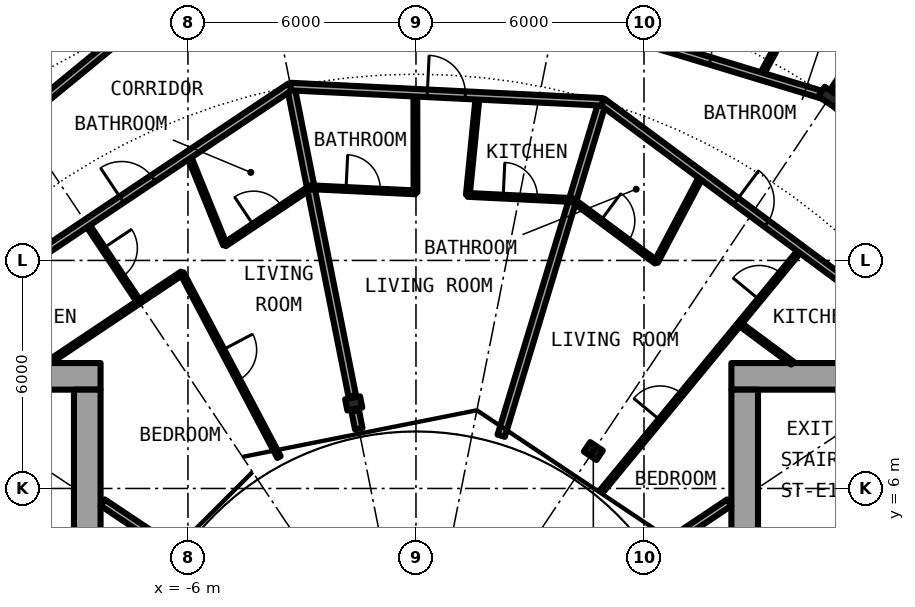
"""IFC4 building model, lengths in metres.
Left out: names, types, materials, properties, quantities, classifications, styles, units other than length and angle.
Written with IfcOpenShell. Run it as: python <this file> out.ifc"""

import sys

from ifc_helpers import new_model, si_unit, direction, frame, frame_2d, origin, origin_2d, place, context, subcontext, project, spatial, rectangle, i_section, extrude, element, fill, save


model = new_model("IFC4")
c1 = context("Model", 3, precision=1e-05, world=origin(), true_north=direction((0.0, 1.0)))
c2 = subcontext(c1, "Body", "Model", "MODEL_VIEW")
j1 = project(units=[si_unit("LENGTHUNIT", "METRE"), si_unit("PLANEANGLEUNIT", "RADIAN")], contexts=[c1])
p1 = place(None, origin())
s1 = spatial("IfcSite", under=j1, at=p1, CompositionType="ELEMENT")
p2 = place(p1, origin())
s2 = spatial("IfcBuilding", under=s1, at=p2, CompositionType="ELEMENT")
p3 = place(p2, frame((0.0, 0.0, 88.0)))
s3 = spatial("IfcBuildingStorey", under=s2, at=p3, CompositionType="ELEMENT", Elevation=88.0)
p4 = place(p3, frame((10.889, 16.297, 0.0), z_axis=(0.0, 0.0, 1.0), x_axis=(0.55557023302, 0.831469612303, 0.0)))
e1 = element("IfcColumn", 1, at=p4, inside=s3, PredefinedType="COLUMN", context=c2, shape_type="SweptSolid", body=[
    extrude(i_section(OverallWidth=0.306, OverallDepth=0.524, WebThickness=0.021, FlangeThickness=0.04, FilletRadius=0.027, at=origin_2d()), origin(), (0.0, 0.0, 1.0), 3.05),
])
for number, where, z_axis, x_axis in (
    (2, (4.667, 6.984, 0.0), (0.0, 0.0, 1.0), (0.556, 0.831, 0.0)),
    (3, (-1.639, 8.239, 0.0), (0.0, 0.0, 1.0), (-0.195, 0.981, 0.0)),
):
    element("IfcColumn", number, at=place(p3, frame(where, z_axis=z_axis, x_axis=x_axis)), inside=s3, PredefinedType="COLUMN", context=c2, shape_type="SweptSolid", body=[
        extrude(i_section(OverallWidth=0.3, OverallDepth=0.4, WebThickness=0.013, FlangeThickness=0.024, FilletRadius=0.027, at=origin_2d()), origin(), (0.0, 0.0, 1.0), 3.05),
    ])
p5 = place(p3, frame((22.3, 8.95, 0.0), z_axis=(0.0, 0.0, 1.0), x_axis=(-1.0, 0.0, 0.0)))
e4 = element("IfcWall", 4, at=p5, inside=s3, PredefinedType="SHEAR", context=c2, shape_type="SweptSolid", body=[
    extrude(rectangle(XDim=14.0, YDim=0.7, at=frame_2d((7.0, 0.0))), origin(), (0.0, 0.0, 1.0), 3.05),
])
p6 = place(p5, frame((1.225, 0.0, 0.0)))
e5 = element("IfcOpeningElement", 5, at=p6, cuts=e4, PredefinedType="OPENING", context=c2, shape_type="SweptSolid", body=[
    extrude(rectangle(XDim=1.2, YDim=2.3, at=frame_2d((0.6, 1.15))), frame((0.0, 0.36, 0.0), z_axis=(0.0, -1.0, 0.0), x_axis=(1.0, 0.0, 0.0)), (0.0, 0.0, 1.0), 0.72),
])
p7 = place(p3, frame((8.65, -8.6, 0.0), z_axis=(0.0, 0.0, 1.0), x_axis=(0.0, 1.0, 0.0)))
e6 = element("IfcWall", 6, at=p7, inside=s3, PredefinedType="SHEAR", context=c2, shape_type="SweptSolid", body=[
    extrude(rectangle(XDim=17.2, YDim=0.7, at=frame_2d((8.6, 0.0))), origin(), (0.0, 0.0, 1.0), 3.05),
])
p8 = place(p7, frame((7.4, 0.0, 0.1)))
e7 = element("IfcOpeningElement", 7, at=p8, cuts=e6, PredefinedType="OPENING", context=c2, shape_type="SweptSolid", body=[
    extrude(rectangle(XDim=2.4, YDim=2.2, at=frame_2d((1.2, 1.1))), frame((0.0, 0.36, 0.0), z_axis=(0.0, -1.0, 0.0), x_axis=(1.0, 0.0, 0.0)), (0.0, 0.0, 1.0), 0.72),
])
p9 = place(p3, frame((-8.3, 8.95, 0.0), z_axis=(0.0, 0.0, 1.0), x_axis=(-1.0, 0.0, 0.0)))
e8 = element("IfcWall", 8, at=p9, inside=s3, PredefinedType="SHEAR", context=c2, shape_type="SweptSolid", body=[
    extrude(rectangle(XDim=14.0, YDim=0.7, at=frame_2d((7.0, 0.0))), origin(), (0.0, 0.0, 1.0), 3.05),
])
p10 = place(p9, frame((11.575, 0.0, 0.0)))
e9 = element("IfcOpeningElement", 9, at=p10, cuts=e8, PredefinedType="OPENING", context=c2, shape_type="SweptSolid", body=[
    extrude(rectangle(XDim=1.2, YDim=2.3, at=frame_2d((0.6, 1.15))), frame((0.0, 0.36, 0.0), z_axis=(0.0, -1.0, 0.0), x_axis=(1.0, 0.0, 0.0)), (0.0, 0.0, 1.0), 0.72),
])
p11 = place(p3, frame((-8.65, 8.6, 0.0), z_axis=(0.0, 0.0, 1.0), x_axis=(0.0, -1.0, 0.0)))
e10 = element("IfcWall", 10, at=p11, inside=s3, PredefinedType="SHEAR", context=c2, shape_type="SweptSolid", body=[
    extrude(rectangle(XDim=17.2, YDim=0.7, at=frame_2d((8.6, 0.0))), origin(), (0.0, 0.0, 1.0), 3.05),
])
p12 = place(p11, frame((7.4, 0.0, 0.1)))
e11 = element("IfcOpeningElement", 11, at=p12, cuts=e10, PredefinedType="OPENING", context=c2, shape_type="SweptSolid", body=[
    extrude(rectangle(XDim=2.4, YDim=2.2, at=frame_2d((1.2, 1.1))), frame((0.0, 0.36, 0.0), z_axis=(0.0, -1.0, 0.0), x_axis=(1.0, 0.0, 0.0)), (0.0, 0.0, 1.0), 0.72),
])
p13 = place(p3, frame((-8.674, 12.982, 0.0), z_axis=(0.0, 0.0, 1.0), x_axis=(0.555355163998, -0.831613276602, 0.0)))
e12 = element("IfcWall", 12, at=p13, inside=s3, PredefinedType="PARTITIONING", context=c2, shape_type="SweptSolid", body=[
    extrude(rectangle(XDim=2.494, YDim=0.1, at=frame_2d((1.247, 0.0))), origin(), (0.0, 0.0, 1.0), 2.7),
])
p14 = place(p13, frame((0.797, 0.0, 0.0)))
e13 = element("IfcOpeningElement", 13, at=p14, cuts=e12, PredefinedType="OPENING", context=c2, shape_type="SweptSolid", body=[
    extrude(rectangle(XDim=0.9, YDim=2.3, at=frame_2d((0.45, 1.15))), frame((0.0, 0.06, 0.0), z_axis=(0.0, -1.0, 0.0), x_axis=(1.0, 0.0, 0.0)), (0.0, 0.0, 1.0), 0.12),
])
p15 = place(p3, frame((-6.159, 11.663, 0.0), z_axis=(0.0, 0.0, 1.0), x_axis=(0.466976820365, -0.884269556889, 0.0)))
e14 = element("IfcWall", 14, at=p15, inside=s3, PredefinedType="PARTITIONING", context=c2, shape_type="SweptSolid", body=[
    extrude(rectangle(XDim=5.469, YDim=0.1, at=frame_2d((2.735, 0.0))), origin(), (0.0, 0.0, 1.0), 2.7),
])
p16 = place(p15, frame((2.284, 0.0, 0.0)))
e15 = element("IfcOpeningElement", 15, at=p16, cuts=e14, PredefinedType="OPENING", context=c2, shape_type="SweptSolid", body=[
    extrude(rectangle(XDim=0.9, YDim=2.3, at=frame_2d((0.45, 1.15))), frame((0.0, 0.06, 0.0), z_axis=(0.0, -1.0, 0.0), x_axis=(1.0, 0.0, 0.0)), (0.0, 0.0, 1.0), 0.12),
])
p17 = place(p3, frame((-5.986, 14.779, 0.0), z_axis=(0.0, 0.0, 1.0), x_axis=(0.375649498413, -0.926761811008, 0.0)))
e16 = element("IfcWall", 16, at=p17, inside=s3, PredefinedType="PARTITIONING", context=c2, shape_type="SweptSolid", body=[
    extrude(rectangle(XDim=2.548, YDim=0.1, at=frame_2d((1.274, 0.0))), origin(), (0.0, 0.0, 1.0), 2.7),
])
p18 = place(p3, frame((-3.297, 16.575, 0.0), z_axis=(0.0, 0.0, 1.0), x_axis=(0.195205282633, -0.980762406311, 0.0)))
e17 = element("IfcWall", 17, at=p18, inside=s3, PredefinedType="PARTITIONING", context=c2, shape_type="SweptSolid", body=[
    extrude(rectangle(XDim=8.3, YDim=0.2, at=frame_2d((4.15, 0.0))), origin(), (0.0, 0.0, 1.0), 2.7),
])
p19 = place(p3, frame((-1.599, 8.043, 0.0), z_axis=(0.0, 0.0, 1.0), x_axis=(0.193768289311, -0.981047323047, 0.0)))
e18 = element("IfcWall", 18, at=p19, inside=s3, PredefinedType="PARTITIONING", context=c2, shape_type="SweptSolid", body=[
    extrude(rectangle(XDim=0.48, YDim=0.2, at=frame_2d((0.24, 0.0))), origin(), (0.0, 0.0, 1.0), 2.7),
])
p20 = place(p3, frame((-0.013, 13.792, 0.0), z_axis=(0.0, 0.0, 1.0), x_axis=(-0.001210427419, 0.999999267432, 0.0)))
e19 = element("IfcWall", 19, at=p20, inside=s3, PredefinedType="PARTITIONING", context=c2, shape_type="SweptSolid", body=[
    extrude(rectangle(XDim=2.622, YDim=0.1, at=frame_2d((1.311, 0.0))), origin(), (0.0, 0.0, 1.0), 2.7),
])
p21 = place(p3, frame((1.365, 13.724, 0.0), z_axis=(0.0, 0.0, 1.0), x_axis=(0.099171803948, 0.995070325807, 0.0)))
e20 = element("IfcWall", 20, at=p21, inside=s3, PredefinedType="PARTITIONING", context=c2, shape_type="SweptSolid", body=[
    extrude(rectangle(XDim=2.622, YDim=0.1, at=frame_2d((1.311, 0.0))), origin(), (0.0, 0.0, 1.0), 2.7),
])
p22 = place(p3, frame((2.243, 7.387, 0.0), z_axis=(0.0, 0.0, 1.0), x_axis=(0.290196345171, 0.956967126525, 0.0)))
e21 = element("IfcWall", 21, at=p22, inside=s3, PredefinedType="PARTITIONING", context=c2, shape_type="SweptSolid", body=[
    extrude(rectangle(XDim=9.18, YDim=0.2, at=frame_2d((4.59, 0.0))), origin(), (0.0, 0.0, 1.0), 2.7),
])
p23 = place(p3, frame((4.909, 5.958, 0.0), z_axis=(0.0, 0.0, 1.0), x_axis=(0.635976043025, 0.771708800454, 0.0)))
e22 = element("IfcWall", 22, at=p23, inside=s3, PredefinedType="PARTITIONING", context=c2, shape_type="SweptSolid", body=[
    extrude(rectangle(XDim=8.213, YDim=0.1, at=frame_2d((4.106, 0.0))), origin(), (0.0, 0.0, 1.0), 2.7),
])
p24 = place(p23, frame((6.49, 0.0, 0.0)))
e23 = element("IfcOpeningElement", 23, at=p24, cuts=e22, PredefinedType="OPENING", context=c2, shape_type="SweptSolid", body=[
    extrude(rectangle(XDim=0.9, YDim=2.3, at=frame_2d((0.45, 1.15))), frame((0.0, 0.06, 0.0), z_axis=(0.0, -1.0, 0.0), x_axis=(1.0, 0.0, 0.0)), (0.0, 0.0, 1.0), 0.12),
])
p25 = place(p23, frame((2.384, 0.0, 0.0)))
e24 = element("IfcOpeningElement", 24, at=p25, cuts=e22, PredefinedType="OPENING", context=c2, shape_type="SweptSolid", body=[
    extrude(rectangle(XDim=0.9, YDim=2.3, at=frame_2d((0.45, 1.15))), frame((0.0, 0.06, 0.0), z_axis=(0.0, -1.0, 0.0), x_axis=(1.0, 0.0, 0.0)), (0.0, 0.0, 1.0), 0.12),
])
p26 = place(p3, frame((6.318, 11.96, 0.0), z_axis=(0.0, 0.0, 1.0), x_axis=(0.467001992543, 0.884256263173, 0.0)))
e25 = element("IfcWall", 25, at=p26, inside=s3, PredefinedType="PARTITIONING", context=c2, shape_type="SweptSolid", body=[
    extrude(rectangle(XDim=2.572, YDim=0.1, at=frame_2d((1.286, 0.0))), origin(), (0.0, 0.0, 1.0), 2.7),
])
p27 = place(p3, frame((9.074, 16.847, 0.0), z_axis=(0.0, 0.0, 1.0), x_axis=(0.474160570331, 0.880438387136, 0.0)))
e26 = element("IfcWall", 26, at=p27, inside=s3, PredefinedType="PARTITIONING", context=c2, shape_type="SweptSolid", body=[
    extrude(rectangle(XDim=2.636, YDim=0.1, at=frame_2d((1.318, 0.0))), origin(), (0.0, 0.0, 1.0), 2.7),
])
p28 = place(p27, frame((0.868, 0.0, 0.0)))
e27 = element("IfcOpeningElement", 27, at=p28, cuts=e26, PredefinedType="OPENING", context=c2, shape_type="SweptSolid", body=[
    extrude(rectangle(XDim=0.9, YDim=2.3, at=frame_2d((0.45, 1.15))), frame((0.0, 0.06, 0.0), z_axis=(0.0, -1.0, 0.0), x_axis=(1.0, 0.0, 0.0)), (0.0, 0.0, 1.0), 0.12),
])
p29 = place(p3, frame((11.035, 16.515, 0.0), z_axis=(0.0, 0.0, 1.0), x_axis=(0.555516661303, 0.831505405283, 0.0)))
e28 = element("IfcWall", 28, at=p29, inside=s3, PredefinedType="PARTITIONING", context=c2, shape_type="SweptSolid", body=[
    extrude(rectangle(XDim=7.312, YDim=0.2, at=frame_2d((3.656, 0.0))), origin(), (0.0, 0.0, 1.0), 2.7),
])
for number, where, z_axis, x_axis in (
    (29, (-6.513, 4.472, 0.0), (0.0, 0.0, 1.0), (-0.831, 0.556, 0.0)),
    (30, (6.513, 4.472, 0.0), (0.0, 0.0, 1.0), (0.831, 0.556, 0.0)),
):
    element("IfcWall", number, at=place(p3, frame(where, z_axis=z_axis, x_axis=x_axis)), inside=s3, PredefinedType="PARTITIONING", context=c2, shape_type="SweptSolid", body=[
        extrude(rectangle(XDim=2.082, YDim=0.2, at=frame_2d((1.041, 0.0))), origin(), (0.0, 0.0, 1.0), 2.7),
    ])
p30 = place(p3, frame((-9.695, 9.3, 0.0), z_axis=(0.0, 0.0, 1.0), x_axis=(0.831369521678, 0.555720000022, 0.0)))
e31 = element("IfcWall", 31, at=p30, inside=s3, PredefinedType="PARTITIONING", context=c2, shape_type="SweptSolid", body=[
    extrude(rectangle(XDim=4.252, YDim=0.1, at=frame_2d((2.126, 0.0))), origin(), (0.0, 0.0, 1.0), 2.7),
])
p31 = place(p3, frame((-5.032, 12.417, 0.0), z_axis=(0.0, 0.0, 1.0), x_axis=(0.831538390496, 0.555467285384, 0.0)))
e32 = element("IfcWall", 32, at=p31, inside=s3, PredefinedType="PARTITIONING", context=c2, shape_type="SweptSolid", body=[
    extrude(rectangle(XDim=2.717, YDim=0.1, at=frame_2d((1.358, 0.0))), origin(), (0.0, 0.0, 1.0), 2.7),
])
p32 = place(p31, frame((0.911, 0.0, 0.0)))
e33 = element("IfcOpeningElement", 33, at=p32, cuts=e32, PredefinedType="OPENING", context=c2, shape_type="SweptSolid", body=[
    extrude(rectangle(XDim=0.9, YDim=2.3, at=frame_2d((0.45, 1.15))), frame((0.0, 0.06, 0.0), z_axis=(0.0, -1.0, 0.0), x_axis=(1.0, 0.0, 0.0)), (0.0, 0.0, 1.0), 0.12),
])
p33 = place(p3, frame((4.122, 13.589, 0.0), z_axis=(0.0, 0.0, 1.0), x_axis=(0.803128348509, -0.595806055542, 0.0)))
e34 = element("IfcWall", 34, at=p33, inside=s3, PredefinedType="PARTITIONING", context=c2, shape_type="SweptSolid", body=[
    extrude(rectangle(XDim=2.734, YDim=0.1, at=frame_2d((1.367, 0.0))), origin(), (0.0, 0.0, 1.0), 2.7),
])
p34 = place(p33, frame((0.917, 0.0, 0.0)))
e35 = element("IfcOpeningElement", 35, at=p34, cuts=e34, PredefinedType="OPENING", context=c2, shape_type="SweptSolid", body=[
    extrude(rectangle(XDim=0.9, YDim=2.3, at=frame_2d((0.45, 1.15))), frame((0.0, 0.06, 0.0), z_axis=(0.0, -1.0, 0.0), x_axis=(1.0, 0.0, 0.0)), (0.0, 0.0, 1.0), 0.12),
])
p35 = place(p3, frame((8.512, 10.332, 0.0), z_axis=(0.0, 0.0, 1.0), x_axis=(0.803135014325, -0.595797070121, 0.0)))
e36 = element("IfcWall", 36, at=p35, inside=s3, PredefinedType="PARTITIONING", context=c2, shape_type="SweptSolid", body=[
    extrude(rectangle(XDim=1.732, YDim=0.1, at=frame_2d((0.866, 0.0))), origin(), (0.0, 0.0, 1.0), 2.7),
])
p36 = place(p3, frame((-2.77, 13.926, 0.0), z_axis=(0.0, 0.0, 1.0), x_axis=(0.99880320044, -0.048909782152, 0.0)))
e37 = element("IfcWall", 37, at=p36, inside=s3, PredefinedType="PARTITIONING", context=c2, shape_type="SweptSolid", body=[
    extrude(rectangle(XDim=2.76, YDim=0.1, at=frame_2d((1.38, 0.0))), origin(), (0.0, 0.0, 1.0), 2.7),
])
p37 = place(p36, frame((0.93, 0.0, 0.0)))
e38 = element("IfcOpeningElement", 38, at=p37, cuts=e37, PredefinedType="OPENING", context=c2, shape_type="SweptSolid", body=[
    extrude(rectangle(XDim=0.9, YDim=2.3, at=frame_2d((0.45, 1.15))), frame((0.0, 0.06, 0.0), z_axis=(0.0, -1.0, 0.0), x_axis=(1.0, 0.0, 0.0)), (0.0, 0.0, 1.0), 0.12),
])
p38 = place(p3, frame((1.365, 13.724, 0.0), z_axis=(0.0, 0.0, 1.0), x_axis=(0.99880320044, -0.048909782152, 0.0)))
e39 = element("IfcWall", 39, at=p38, inside=s3, PredefinedType="PARTITIONING", context=c2, shape_type="SweptSolid", body=[
    extrude(rectangle(XDim=2.76, YDim=0.1, at=frame_2d((1.38, 0.0))), origin(), (0.0, 0.0, 1.0), 2.7),
])
p39 = place(p38, frame((0.93, 0.0, 0.0)))
e40 = element("IfcOpeningElement", 40, at=p39, cuts=e39, PredefinedType="OPENING", context=c2, shape_type="SweptSolid", body=[
    extrude(rectangle(XDim=0.9, YDim=2.3, at=frame_2d((0.45, 1.15))), frame((0.0, 0.06, 0.0), z_axis=(0.0, -1.0, 0.0), x_axis=(1.0, 0.0, 0.0)), (0.0, 0.0, 1.0), 0.12),
])
p40 = place(p3, frame((-12.708, 10.286, 0.0), z_axis=(0.0, 0.0, 1.0), x_axis=(0.831405725802, 0.555665834026, 0.0)))
e41 = element("IfcWall", 41, at=p40, inside=s3, PredefinedType="PARTITIONING", context=c2, shape_type="SweptSolid", body=[
    extrude(rectangle(XDim=11.314, YDim=0.2, at=frame_2d((5.657, 0.0))), origin(), (0.0, 0.0, 1.0), 2.7),
])
p41 = place(p40, frame((5.969, 0.0, 0.0)))
e42 = element("IfcOpeningElement", 42, at=p41, cuts=e41, PredefinedType="OPENING", context=c2, shape_type="SweptSolid", body=[
    extrude(rectangle(XDim=1.0, YDim=2.3, at=frame_2d((0.5, 1.15))), frame((0.0, 0.11, 0.0), z_axis=(0.0, -1.0, 0.0), x_axis=(1.0, 0.0, 0.0)), (0.0, 0.0, 1.0), 0.22),
])
p42 = place(p3, frame((4.906, 16.172, 0.0), z_axis=(0.0, 0.0, 1.0), x_axis=(0.803191461888, -0.595720971219, 0.0)))
e43 = element("IfcWall", 43, at=p42, inside=s3, PredefinedType="PARTITIONING", context=c2, shape_type="SweptSolid", body=[
    extrude(rectangle(XDim=9.76, YDim=0.2, at=frame_2d((4.88, 0.0))), origin(), (0.0, 0.0, 1.0), 2.7),
])
p43 = place(p42, frame((4.38, 0.0, 0.0)))
e44 = element("IfcOpeningElement", 44, at=p43, cuts=e43, PredefinedType="OPENING", context=c2, shape_type="SweptSolid", body=[
    extrude(rectangle(XDim=1.0, YDim=2.3, at=frame_2d((0.5, 1.15))), frame((0.0, 0.11, 0.0), z_axis=(0.0, -1.0, 0.0), x_axis=(1.0, 0.0, 0.0)), (0.0, 0.0, 1.0), 0.22),
])
p44 = place(p3, frame((-3.298, 16.574, 0.0), z_axis=(0.0, 0.0, 1.0), x_axis=(0.998802523271, -0.048923608895, 0.0)))
e45 = element("IfcWall", 45, at=p44, inside=s3, PredefinedType="PARTITIONING", context=c2, shape_type="SweptSolid", body=[
    extrude(rectangle(XDim=8.214, YDim=0.2, at=frame_2d((4.107, 0.0))), origin(), (0.0, 0.0, 1.0), 2.7),
])
p45 = place(p44, frame((3.6, 0.0, 0.0)))
e46 = element("IfcOpeningElement", 46, at=p45, cuts=e45, PredefinedType="OPENING", context=c2, shape_type="SweptSolid", body=[
    extrude(rectangle(XDim=1.0, YDim=2.3, at=frame_2d((0.5, 1.15))), frame((0.0, 0.11, 0.0), z_axis=(0.0, -1.0, 0.0), x_axis=(1.0, 0.0, 0.0)), (0.0, 0.0, 1.0), 0.22),
])
p46 = place(p3, frame((-0.007, 19.599, 0.0), z_axis=(0.0, 0.0, 1.0), x_axis=(0.95700958731, -0.290056287291, 0.0)))
e47 = element("IfcWall", 47, at=p46, inside=s3, PredefinedType="PARTITIONING", context=c2, shape_type="SweptSolid", body=[
    extrude(rectangle(XDim=11.226, YDim=0.2, at=frame_2d((5.613, 0.0))), origin(), (0.0, 0.0, 1.0), 2.38),
])
p47 = place(p46, frame((7.093, 0.0, 0.0)))
e48 = element("IfcOpeningElement", 48, at=p47, cuts=e47, PredefinedType="OPENING", context=c2, shape_type="SweptSolid", body=[
    extrude(rectangle(XDim=1.0, YDim=2.3, at=frame_2d((0.5, 1.15))), frame((0.0, 0.11, 0.0), z_axis=(0.0, -1.0, 0.0), x_axis=(1.0, 0.0, 0.0)), (0.0, 0.0, 1.0), 0.22),
])
p48 = place(p3, frame((-16.173, 10.991, 0.0), z_axis=(0.0, 0.0, 1.0), x_axis=(0.773049018445, 0.634346289562, 0.0)))
e49 = element("IfcWall", 49, at=p48, inside=s3, PredefinedType="PARTITIONING", context=c2, shape_type="SweptSolid", body=[
    extrude(rectangle(XDim=11.219, YDim=0.2, at=frame_2d((5.61, 0.0))), origin(), (0.0, 0.0, 1.0), 2.38),
])
p49 = place(p48, frame((3.135, 0.0, 0.0)))
e50 = element("IfcOpeningElement", 50, at=p49, cuts=e49, PredefinedType="OPENING", context=c2, shape_type="SweptSolid", body=[
    extrude(rectangle(XDim=1.0, YDim=2.3, at=frame_2d((0.5, 1.15))), frame((0.0, 0.11, 0.0), z_axis=(0.0, -1.0, 0.0), x_axis=(1.0, 0.0, 0.0)), (0.0, 0.0, 1.0), 0.22),
])
p50 = place(p3, frame((11.0, 16.186, 0.0), z_axis=(0.0, 0.0, 1.0), x_axis=(0.707106781187, -0.707106781187, 0.0)))
e51 = element("IfcWall", 51, at=p50, inside=s3, PredefinedType="PARTITIONING", context=c2, shape_type="SweptSolid", body=[
    extrude(rectangle(XDim=7.334, YDim=0.2, at=frame_2d((3.667, 0.0))), origin(), (0.0, 0.0, 1.0), 2.38),
])
p51 = place(p50, frame((2.211, 0.0, 0.0)))
e52 = element("IfcOpeningElement", 52, at=p51, cuts=e51, PredefinedType="OPENING", context=c2, shape_type="SweptSolid", body=[
    extrude(rectangle(XDim=1.0, YDim=2.3, at=frame_2d((0.5, 1.15))), frame((0.0, 0.11, 0.0), z_axis=(0.0, -1.0, 0.0), x_axis=(1.0, 0.0, 0.0)), (0.0, 0.0, 1.0), 0.22),
])
p52 = place(p3, frame((-13.538, 16.496, 0.0), z_axis=(0.0, 0.0, 1.0), x_axis=(0.773000340237, 0.634405606843, 0.0)))
e53 = element("IfcWall", 53, at=p52, inside=s3, PredefinedType="PARTITIONING", context=c2, shape_type="SweptSolid", body=[
    extrude(rectangle(XDim=6.474, YDim=0.1, at=frame_2d((3.237, 0.0))), origin(), (0.0, 0.0, 1.0), 2.7),
])
p53 = place(p47, origin())
e54 = element("IfcDoor", 54, at=p53, inside=s3, OperationType="SINGLE_SWING_RIGHT", PredefinedType="DOOR", context=c2, shape_type="SweptSolid", body=[
    extrude(rectangle(XDim=1.0, YDim=2.3, at=frame_2d((0.5, 1.15))), frame((0.0, 0.025, 0.0), z_axis=(0.0, -1.0, 0.0), x_axis=(1.0, 0.0, 0.0)), (0.0, 0.0, 1.0), 0.05),
])
fill(e48, e54)
p54 = place(p43, origin())
e55 = element("IfcDoor", 55, at=p54, inside=s3, OperationType="SINGLE_SWING_LEFT", PredefinedType="DOOR", context=c2, shape_type="SweptSolid", body=[
    extrude(rectangle(XDim=1.0, YDim=2.3, at=frame_2d((0.5, 1.15))), frame((0.0, 0.025, 0.0), z_axis=(0.0, -1.0, 0.0), x_axis=(1.0, 0.0, 0.0)), (0.0, 0.0, 1.0), 0.05),
])
fill(e44, e55)
p55 = place(p34, origin())
e56 = element("IfcDoor", 56, at=p55, inside=s3, OperationType="SINGLE_SWING_LEFT", PredefinedType="DOOR", context=c2, shape_type="SweptSolid", body=[
    extrude(rectangle(XDim=0.9, YDim=2.3, at=frame_2d((0.45, 1.15))), frame((0.0, 0.025, 0.0), z_axis=(0.0, -1.0, 0.0), x_axis=(1.0, 0.0, 0.0)), (0.0, 0.0, 1.0), 0.05),
])
fill(e35, e56)
p56 = place(p24, origin())
e57 = element("IfcDoor", 57, at=p56, inside=s3, OperationType="SINGLE_SWING_RIGHT", PredefinedType="DOOR", context=c2, shape_type="SweptSolid", body=[
    extrude(rectangle(XDim=0.9, YDim=2.3, at=frame_2d((0.45, 1.15))), frame((0.0, 0.025, 0.0), z_axis=(0.0, -1.0, 0.0), x_axis=(1.0, 0.0, 0.0)), (0.0, 0.0, 1.0), 0.05),
])
fill(e23, e57)
p57 = place(p25, origin())
e58 = element("IfcDoor", 58, at=p57, inside=s3, OperationType="SINGLE_SWING_LEFT", PredefinedType="DOOR", context=c2, shape_type="SweptSolid", body=[
    extrude(rectangle(XDim=0.9, YDim=2.3, at=frame_2d((0.45, 1.15))), frame((0.0, 0.025, 0.0), z_axis=(0.0, -1.0, 0.0), x_axis=(1.0, 0.0, 0.0)), (0.0, 0.0, 1.0), 0.05),
])
fill(e24, e58)
p58 = place(p45, origin())
e59 = element("IfcDoor", 59, at=p58, inside=s3, OperationType="SINGLE_SWING_LEFT", PredefinedType="DOOR", context=c2, shape_type="SweptSolid", body=[
    extrude(rectangle(XDim=1.0, YDim=2.3, at=frame_2d((0.5, 1.15))), frame((0.0, 0.025, 0.0), z_axis=(0.0, -1.0, 0.0), x_axis=(1.0, 0.0, 0.0)), (0.0, 0.0, 1.0), 0.05),
])
fill(e46, e59)
p59 = place(p37, origin())
e60 = element("IfcDoor", 60, at=p59, inside=s3, OperationType="SINGLE_SWING_LEFT", PredefinedType="DOOR", context=c2, shape_type="SweptSolid", body=[
    extrude(rectangle(XDim=0.9, YDim=2.3, at=frame_2d((0.45, 1.15))), frame((0.0, 0.025, 0.0), z_axis=(0.0, -1.0, 0.0), x_axis=(1.0, 0.0, 0.0)), (0.0, 0.0, 1.0), 0.05),
])
fill(e38, e60)
p60 = place(p39, origin())
e61 = element("IfcDoor", 61, at=p60, inside=s3, OperationType="SINGLE_SWING_RIGHT", PredefinedType="DOOR", context=c2, shape_type="SweptSolid", body=[
    extrude(rectangle(XDim=0.9, YDim=2.3, at=frame_2d((0.45, 1.15))), frame((0.0, 0.025, 0.0), z_axis=(0.0, -1.0, 0.0), x_axis=(1.0, 0.0, 0.0)), (0.0, 0.0, 1.0), 0.05),
])
fill(e40, e61)
p61 = place(p41, origin())
e62 = element("IfcDoor", 62, at=p61, inside=s3, OperationType="SINGLE_SWING_RIGHT", PredefinedType="DOOR", context=c2, shape_type="SweptSolid", body=[
    extrude(rectangle(XDim=1.0, YDim=2.3, at=frame_2d((0.5, 1.15))), frame((0.0, 0.025, 0.0), z_axis=(0.0, -1.0, 0.0), x_axis=(1.0, 0.0, 0.0)), (0.0, 0.0, 1.0), 0.05),
])
fill(e42, e62)
p62 = place(p32, origin())
e63 = element("IfcDoor", 63, at=p62, inside=s3, OperationType="SINGLE_SWING_RIGHT", PredefinedType="DOOR", context=c2, shape_type="SweptSolid", body=[
    extrude(rectangle(XDim=0.9, YDim=2.3, at=frame_2d((0.45, 1.15))), frame((0.0, 0.025, 0.0), z_axis=(0.0, -1.0, 0.0), x_axis=(1.0, 0.0, 0.0)), (0.0, 0.0, 1.0), 0.05),
])
fill(e33, e63)
p63 = place(p14, origin())
e64 = element("IfcDoor", 64, at=p63, inside=s3, OperationType="SINGLE_SWING_RIGHT", PredefinedType="DOOR", context=c2, shape_type="SweptSolid", body=[
    extrude(rectangle(XDim=0.9, YDim=2.3, at=frame_2d((0.45, 1.15))), frame((0.0, 0.025, 0.0), z_axis=(0.0, -1.0, 0.0), x_axis=(1.0, 0.0, 0.0)), (0.0, 0.0, 1.0), 0.05),
])
fill(e13, e64)
p64 = place(p16, origin())
e65 = element("IfcDoor", 65, at=p64, inside=s3, OperationType="SINGLE_SWING_RIGHT", PredefinedType="DOOR", context=c2, shape_type="SweptSolid", body=[
    extrude(rectangle(XDim=0.9, YDim=2.3, at=frame_2d((0.45, 1.15))), frame((0.0, 0.025, 0.0), z_axis=(0.0, -1.0, 0.0), x_axis=(1.0, 0.0, 0.0)), (0.0, 0.0, 1.0), 0.05),
])
fill(e15, e65)
save(model, sys.argv[1])
